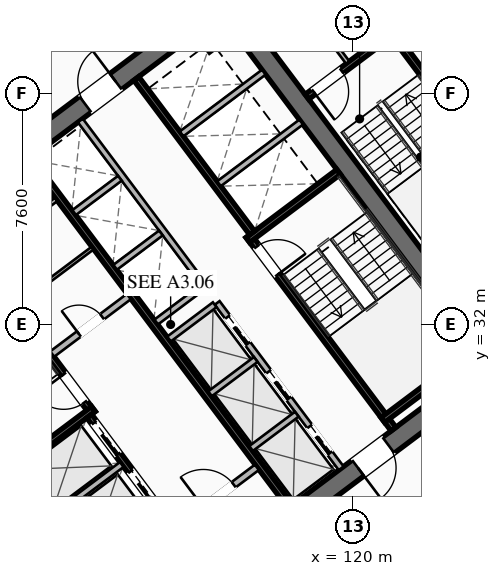
"""IFC4 building model, lengths in metres.
Left out: names, types, materials, properties, quantities, classifications, styles, units other than length and angle.
Written with IfcOpenShell. Run it as: python <this file> out.ifc"""

import sys

from ifc_helpers import new_model, si_unit, direction, frame, frame_2d, origin, place, context, subcontext, project, spatial, rectangle, extrude, element, fill, save


model = new_model("IFC4")
c1 = context("Model", 3, precision=1e-05, world=origin(), true_north=direction((0.0, 1.0)))
c2 = subcontext(c1, "Body", "Model", "MODEL_VIEW")
j1 = project(units=[si_unit("LENGTHUNIT", "METRE"), si_unit("PLANEANGLEUNIT", "RADIAN")], contexts=[c1])
p1 = place(None, origin())
s1 = spatial("IfcSite", under=j1, at=p1, CompositionType="ELEMENT")
p2 = place(p1, origin())
s2 = spatial("IfcBuilding", under=s1, at=p2, CompositionType="ELEMENT")
p3 = place(p2, frame((0.0, 0.0, 42.35)))
s3 = spatial("IfcBuildingStorey", under=s2, at=p3, CompositionType="ELEMENT", Elevation=42.35)
for number, where, z_axis, x_axis in (
    (1, (112.476, 21.107, 0.0), (0.0, 0.0, 1.0), (-0.6, 0.8, 0.0)),
    (2, (115.524, 42.893, 0.0), (0.0, 0.0, 1.0), (0.6, -0.8, 0.0)),
):
    element("IfcWall", number, at=place(p3, frame(where, z_axis=z_axis, x_axis=x_axis)), inside=s3, PredefinedType="SHEAR", context=c2, shape_type="SweptSolid", body=[
        extrude(rectangle(XDim=15.6, YDim=0.65, at=frame_2d((7.8, 0.0))), origin(), (0.0, 0.0, 1.0), 3.55),
    ])
p4 = place(p3, frame((124.429, 30.478, 0.0), z_axis=(0.0, 0.0, 1.0), x_axis=(-0.799998028465, -0.600002628705, 0.0)))
e3 = element("IfcWall", 3, at=p4, inside=s3, PredefinedType="SHEAR", context=c2, shape_type="SweptSolid", body=[
    extrude(rectangle(XDim=14.86, YDim=0.65, at=frame_2d((7.43, 0.0))), origin(), (0.0, 0.0, 1.0), 3.55),
])
p5 = place(p4, frame((9.13, 0.0, 0.0)))
e4 = element("IfcOpeningElement", 4, at=p5, cuts=e3, PredefinedType="OPENING", context=c2, shape_type="SweptSolid", body=[
    extrude(rectangle(XDim=1.25, YDim=2.25, at=frame_2d((0.625, 1.125))), frame((0.0, 0.335, 0.0), z_axis=(0.0, -1.0, 0.0), x_axis=(1.0, 0.0, 0.0)), (0.0, 0.0, 1.0), 0.67),
])
p6 = place(p4, frame((4.08, 0.0, 0.0)))
e5 = element("IfcOpeningElement", 5, at=p6, cuts=e3, PredefinedType="OPENING", context=c2, shape_type="SweptSolid", body=[
    extrude(rectangle(XDim=1.25, YDim=2.25, at=frame_2d((0.625, 1.125))), frame((0.0, 0.335, 0.0), z_axis=(0.0, -1.0, 0.0), x_axis=(1.0, 0.0, 0.0)), (0.0, 0.0, 1.0), 0.67),
])
p7 = place(p3, frame((103.571, 33.522, 0.0), z_axis=(0.0, 0.0, 1.0), x_axis=(0.799998028465, 0.600002628705, 0.0)))
e6 = element("IfcWall", 6, at=p7, inside=s3, PredefinedType="SHEAR", context=c2, shape_type="SweptSolid", body=[
    extrude(rectangle(XDim=14.86, YDim=0.65, at=frame_2d((7.43, 0.0))), origin(), (0.0, 0.0, 1.0), 3.55),
])
p8 = place(p7, frame((4.48, 0.0, 0.0)))
e7 = element("IfcOpeningElement", 7, at=p8, cuts=e6, PredefinedType="OPENING", context=c2, shape_type="SweptSolid", body=[
    extrude(rectangle(XDim=1.25, YDim=2.25, at=frame_2d((0.625, 1.125))), frame((0.0, 0.335, 0.0), z_axis=(0.0, -1.0, 0.0), x_axis=(1.0, 0.0, 0.0)), (0.0, 0.0, 1.0), 0.67),
])
p9 = place(p7, frame((9.53, 0.0, 0.0)))
e8 = element("IfcOpeningElement", 8, at=p9, cuts=e6, PredefinedType="OPENING", context=c2, shape_type="SweptSolid", body=[
    extrude(rectangle(XDim=1.25, YDim=2.25, at=frame_2d((0.625, 1.125))), frame((0.0, 0.335, 0.0), z_axis=(0.0, -1.0, 0.0), x_axis=(1.0, 0.0, 0.0)), (0.0, 0.0, 1.0), 0.67),
])
p10 = place(p3, frame((111.44, 29.08, 0.0), z_axis=(0.0, 0.0, 1.0), x_axis=(-0.600009827119, 0.799992629566, 0.0)))
e9 = element("IfcWall", 9, at=p10, inside=s3, PredefinedType="SHEAR", context=c2, shape_type="SweptSolid", body=[
    extrude(rectangle(XDim=7.95, YDim=0.2, at=frame_2d((3.975, 0.0))), origin(), (0.0, 0.0, 1.0), 3.35),
])
p11 = place(p10, frame((0.45, 0.0, 0.0)))
e10 = element("IfcOpeningElement", 10, at=p11, cuts=e9, PredefinedType="OPENING", context=c2, shape_type="SweptSolid", body=[
    extrude(rectangle(XDim=1.15, YDim=2.2, at=frame_2d((0.575, 1.1))), frame((0.0, 0.11, 0.0), z_axis=(0.0, -1.0, 0.0), x_axis=(1.0, 0.0, 0.0)), (0.0, 0.0, 1.0), 0.22),
])
p12 = place(p3, frame((108.476, 26.982, 0.0), z_axis=(0.0, 0.0, 1.0), x_axis=(0.799984290658, 0.600020945218, 0.0)))
e11 = element("IfcWall", 11, at=p12, inside=s3, PredefinedType="SHEAR", context=c2, shape_type="SweptSolid", body=[
    extrude(rectangle(XDim=3.73, YDim=0.2, at=frame_2d((1.865, 0.0))), origin(), (0.0, 0.0, 1.0), 3.35),
])
p13 = place(p3, frame((116.56, 34.92, 0.0), z_axis=(0.0, 0.0, 1.0), x_axis=(0.600009827119, -0.799992629566, 0.0)))
e12 = element("IfcWall", 12, at=p13, inside=s3, PredefinedType="SHEAR", context=c2, shape_type="SweptSolid", body=[
    extrude(rectangle(XDim=7.95, YDim=0.2, at=frame_2d((3.975, 0.0))), origin(), (0.0, 0.0, 1.0), 3.35),
])
p14 = place(p13, frame((0.45, 0.0, 0.0)))
e13 = element("IfcOpeningElement", 13, at=p14, cuts=e12, PredefinedType="OPENING", context=c2, shape_type="SweptSolid", body=[
    extrude(rectangle(XDim=1.15, YDim=2.2, at=frame_2d((0.575, 1.1))), frame((0.0, 0.11, 0.0), z_axis=(0.0, -1.0, 0.0), x_axis=(1.0, 0.0, 0.0)), (0.0, 0.0, 1.0), 0.22),
])
for number, where, z_axis, x_axis in (
    (14, (116.54, 34.78, 0.0), (0.0, 0.0, 1.0), (0.8, 0.6, 0.0)),
    (15, (120.98, 28.86, 0.0), (0.0, 0.0, 1.0), (0.8, 0.6, 0.0)),
):
    element("IfcWall", number, at=place(p3, frame(where, z_axis=z_axis, x_axis=x_axis)), inside=s3, PredefinedType="SHEAR", context=c2, shape_type="SweptSolid", body=[
        extrude(rectangle(XDim=3.73, YDim=0.2, at=frame_2d((1.865, 0.0))), origin(), (0.0, 0.0, 1.0), 3.35),
    ])
p15 = place(p3, frame((117.938, 26.016, 0.0), z_axis=(0.0, 0.0, 1.0), x_axis=(-0.600005463273, 0.799995902516, 0.0)))
e16 = element("IfcWall", 16, at=p15, inside=s3, PredefinedType="SHEAR", context=c2, shape_type="SweptSolid", body=[
    extrude(rectangle(XDim=14.3, YDim=0.2, at=frame_2d((7.15, 0.0))), origin(), (0.0, 0.0, 1.0), 3.35),
])
p16 = place(p3, frame((110.104, 31.028, 0.0), z_axis=(0.0, 0.0, 1.0), x_axis=(0.800018601094, 0.59997519774, 0.0)))
e17 = element("IfcWall", 17, at=p16, inside=s3, PredefinedType="SOLIDWALL", context=c2, shape_type="SweptSolid", body=[
    extrude(rectangle(XDim=3.15, YDim=0.22, at=frame_2d((1.575, 0.0))), origin(), (0.0, 0.0, 1.0), 2.703),
])
p17 = place(p16, frame((1.1, 0.0, 0.0)))
e18 = element("IfcOpeningElement", 18, at=p17, cuts=e17, PredefinedType="OPENING", context=c2, shape_type="SweptSolid", body=[
    extrude(rectangle(XDim=0.95, YDim=2.05, at=frame_2d((0.475, 1.025))), frame((0.0, 0.12, 0.0), z_axis=(0.0, -1.0, 0.0), x_axis=(1.0, 0.0, 0.0)), (0.0, 0.0, 1.0), 0.24),
])
p18 = place(p3, frame((114.316, 25.412, 0.0), z_axis=(0.0, 0.0, 1.0), x_axis=(0.800018601094, 0.59997519774, 0.0)))
e19 = element("IfcWall", 19, at=p18, inside=s3, PredefinedType="SOLIDWALL", context=c2, shape_type="SweptSolid", body=[
    extrude(rectangle(XDim=3.15, YDim=0.22, at=frame_2d((1.575, 0.0))), origin(), (0.0, 0.0, 1.0), 2.703),
])
p19 = place(p18, frame((0.95, 0.0, 0.0)))
e20 = element("IfcOpeningElement", 20, at=p19, cuts=e19, PredefinedType="OPENING", context=c2, shape_type="SweptSolid", body=[
    extrude(rectangle(XDim=1.25, YDim=2.25, at=frame_2d((0.625, 1.125))), frame((0.0, 0.12, 0.0), z_axis=(0.0, -1.0, 0.0), x_axis=(1.0, 0.0, 0.0)), (0.0, 0.0, 1.0), 0.24),
])
p20 = place(p3, frame((115.13, 23.91, 0.0), z_axis=(0.0, 0.0, 1.0), x_axis=(-0.599975393228, 0.800018454488, 0.0)))
e21 = element("IfcWall", 21, at=p20, inside=s3, PredefinedType="SHEAR", context=c2, shape_type="SweptSolid", body=[
    extrude(rectangle(XDim=6.35, YDim=0.2, at=frame_2d((3.175, 0.0))), origin(), (0.0, 0.0, 1.0), 3.35),
])
p21 = place(p20, frame((4.775, 0.0, 0.0)))
e22 = element("IfcOpeningElement", 22, at=p21, cuts=e21, PredefinedType="OPENING", context=c2, shape_type="SweptSolid", body=[
    extrude(rectangle(XDim=1.3, YDim=2.25, at=frame_2d((0.65, 1.125))), frame((0.0, 0.11, 0.0), z_axis=(0.0, -1.0, 0.0), x_axis=(1.0, 0.0, 0.0)), (0.0, 0.0, 1.0), 0.22),
])
p22 = place(p20, frame((2.775, 0.0, 0.0)))
e23 = element("IfcOpeningElement", 23, at=p22, cuts=e21, PredefinedType="OPENING", context=c2, shape_type="SweptSolid", body=[
    extrude(rectangle(XDim=1.3, YDim=2.25, at=frame_2d((0.65, 1.125))), frame((0.0, 0.11, 0.0), z_axis=(0.0, -1.0, 0.0), x_axis=(1.0, 0.0, 0.0)), (0.0, 0.0, 1.0), 0.22),
])
p23 = place(p20, frame((0.575, 0.0, 0.0)))
e24 = element("IfcOpeningElement", 24, at=p23, cuts=e21, PredefinedType="OPENING", context=c2, shape_type="SweptSolid", body=[
    extrude(rectangle(XDim=1.3, YDim=2.25, at=frame_2d((0.65, 1.125))), frame((0.0, 0.11, 0.0), z_axis=(0.0, -1.0, 0.0), x_axis=(1.0, 0.0, 0.0)), (0.0, 0.0, 1.0), 0.22),
])
p24 = place(p3, frame((109.688, 25.366, 0.0), z_axis=(0.0, 0.0, 1.0), x_axis=(0.8, 0.6, 0.0)))
e25 = element("IfcWall", 25, at=p24, inside=s3, PredefinedType="SOLIDWALL", context=c2, shape_type="SweptSolid", body=[
    extrude(rectangle(XDim=3.38, YDim=0.2, at=frame_2d((1.69, 0.0))), origin(), (0.0, 0.0, 1.0), 3.35),
])
p25 = place(p3, frame((112.87, 40.09, 0.0), z_axis=(0.0, 0.0, 1.0), x_axis=(0.599975393228, -0.800018454488, 0.0)))
e26 = element("IfcWall", 26, at=p25, inside=s3, PredefinedType="SHEAR", context=c2, shape_type="SweptSolid", body=[
    extrude(rectangle(XDim=6.35, YDim=0.2, at=frame_2d((3.175, 0.0))), origin(), (0.0, 0.0, 1.0), 3.35),
])
for number, where, z_axis, x_axis in (
    (27, (115.59, 36.63, 0.0), (0.0, 0.0, 1.0), (0.8, 0.6, 0.0)),
    (28, (114.36, 38.27, 0.0), (0.0, 0.0, 1.0), (0.8, 0.6, 0.0)),
):
    element("IfcWall", number, at=place(p3, frame(where, z_axis=z_axis, x_axis=x_axis)), inside=s3, PredefinedType="SOLIDWALL", context=c2, shape_type="SweptSolid", body=[
        extrude(rectangle(XDim=3.38, YDim=0.2, at=frame_2d((1.69, 0.0))), origin(), (0.0, 0.0, 1.0), 3.35),
    ])
p26 = place(p3, frame((107.71, 34.22, 0.0), z_axis=(0.0, 0.0, 1.0), x_axis=(0.799981399002, 0.60002480053, 0.0)))
e29 = element("IfcWall", 29, at=p26, inside=s3, PredefinedType="PARTITIONING", context=c2, shape_type="SweptSolid", body=[
    extrude(rectangle(XDim=3.15, YDim=0.135, at=frame_2d((1.575, 0.0))), origin(), (0.0, 0.0, 1.0), 2.703),
])
p27 = place(p26, frame((1.05, 0.0, 0.0)))
e30 = element("IfcOpeningElement", 30, at=p27, cuts=e29, PredefinedType="OPENING", context=c2, shape_type="SweptSolid", body=[
    extrude(rectangle(XDim=1.05, YDim=2.2, at=frame_2d((0.525, 1.1))), frame((0.0, 0.077, 0.0), z_axis=(0.0, -1.0, 0.0), x_axis=(1.0, 0.0, 0.0)), (0.0, 0.0, 1.0), 0.155),
])
p28 = place(p3, frame((108.91, 32.62, 0.0), z_axis=(0.0, 0.0, 1.0), x_axis=(0.800018601094, 0.59997519774, 0.0)))
e31 = element("IfcWall", 31, at=p28, inside=s3, PredefinedType="PARTITIONING", context=c2, shape_type="SweptSolid", body=[
    extrude(rectangle(XDim=3.15, YDim=0.11, at=frame_2d((1.575, 0.0))), origin(), (0.0, 0.0, 1.0), 2.703),
])
p29 = place(p3, frame((119.61, 27.27, 0.0), z_axis=(0.0, 0.0, 1.0), x_axis=(-0.600011488909, 0.79999138319, 0.0)))
e32 = element("IfcWall", 32, at=p29, inside=s3, PredefinedType="SOLIDWALL", context=c2, shape_type="SweptSolid", body=[
    extrude(rectangle(XDim=6.8, YDim=0.2, at=frame_2d((3.4, 0.0))), origin(), (0.0, 0.0, 1.0), 3.35),
])
p30 = place(p29, frame((0.625, 0.0, 0.0)))
e33 = element("IfcOpeningElement", 33, at=p30, cuts=e32, PredefinedType="OPENING", context=c2, shape_type="SweptSolid", body=[
    extrude(rectangle(XDim=1.1, YDim=2.2, at=frame_2d((0.55, 1.1))), frame((0.0, 0.11, 0.0), z_axis=(0.0, -1.0, 0.0), x_axis=(1.0, 0.0, 0.0)), (0.0, 0.0, 1.0), 0.22),
])
p31 = place(p29, frame((2.875, 0.0, 0.0)))
e34 = element("IfcOpeningElement", 34, at=p31, cuts=e32, PredefinedType="OPENING", context=c2, shape_type="SweptSolid", body=[
    extrude(rectangle(XDim=1.1, YDim=2.2, at=frame_2d((0.55, 1.1))), frame((0.0, 0.11, 0.0), z_axis=(0.0, -1.0, 0.0), x_axis=(1.0, 0.0, 0.0)), (0.0, 0.0, 1.0), 0.22),
])
p32 = place(p29, frame((5.125, 0.0, 0.0)))
e35 = element("IfcOpeningElement", 35, at=p32, cuts=e32, PredefinedType="OPENING", context=c2, shape_type="SweptSolid", body=[
    extrude(rectangle(XDim=1.1, YDim=2.2, at=frame_2d((0.55, 1.1))), frame((0.0, 0.11, 0.0), z_axis=(0.0, -1.0, 0.0), x_axis=(1.0, 0.0, 0.0)), (0.0, 0.0, 1.0), 0.22),
])
p33 = place(p3, frame((116.646, 27.922, 0.0), z_axis=(0.0, 0.0, 1.0), x_axis=(0.8, 0.6, 0.0)))
e36 = element("IfcWall", 36, at=p33, inside=s3, PredefinedType="SOLIDWALL", context=c2, shape_type="SweptSolid", body=[
    extrude(rectangle(XDim=1.88, YDim=0.2, at=frame_2d((0.94, 0.0))), origin(), (0.0, 0.0, 1.0), 3.35),
])
p34 = place(p3, frame((115.296, 29.722, 0.0), z_axis=(0.0, 0.0, 1.0), x_axis=(0.799984418148, 0.600020775241, 0.0)))
e37 = element("IfcWall", 37, at=p34, inside=s3, PredefinedType="SOLIDWALL", context=c2, shape_type="SweptSolid", body=[
    extrude(rectangle(XDim=1.88, YDim=0.2, at=frame_2d((0.94, 0.0))), origin(), (0.0, 0.0, 1.0), 3.35),
])
p35 = place(p3, frame((113.946, 31.522, 0.0), z_axis=(0.0, 0.0, 1.0), x_axis=(0.8, 0.6, 0.0)))
e38 = element("IfcWall", 38, at=p35, inside=s3, PredefinedType="SOLIDWALL", context=c2, shape_type="SweptSolid", body=[
    extrude(rectangle(XDim=1.88, YDim=0.2, at=frame_2d((0.94, 0.0))), origin(), (0.0, 0.0, 1.0), 3.35),
])
p36 = place(p3, frame((115.11, 33.27, 0.0), z_axis=(0.0, 0.0, 1.0), x_axis=(-0.600011488909, 0.79999138319, 0.0)))
e39 = element("IfcWall", 39, at=p36, inside=s3, PredefinedType="SOLIDWALL", context=c2, shape_type="SweptSolid", body=[
    extrude(rectangle(XDim=6.8, YDim=0.2, at=frame_2d((3.4, 0.0))), origin(), (0.0, 0.0, 1.0), 3.35),
])
p37 = place(p3, frame((113.526, 32.082, 0.0), z_axis=(0.0, 0.0, 1.0), x_axis=(0.800046745961, 0.599937666993, 0.0)))
e40 = element("IfcWall", 40, at=p37, inside=s3, PredefinedType="SOLIDWALL", context=c2, shape_type="SweptSolid", body=[
    extrude(rectangle(XDim=1.88, YDim=0.2, at=frame_2d((0.94, 0.0))), origin(), (0.0, 0.0, 1.0), 3.35),
])
p38 = place(p3, frame((112.176, 33.882, 0.0), z_axis=(0.0, 0.0, 1.0), x_axis=(0.8, 0.6, 0.0)))
e41 = element("IfcWall", 41, at=p38, inside=s3, PredefinedType="SOLIDWALL", context=c2, shape_type="SweptSolid", body=[
    extrude(rectangle(XDim=1.88, YDim=0.2, at=frame_2d((0.94, 0.0))), origin(), (0.0, 0.0, 1.0), 3.35),
])
p39 = place(p3, frame((110.826, 35.682, 0.0), z_axis=(0.0, 0.0, 1.0), x_axis=(0.799984418148, 0.600020775241, 0.0)))
e42 = element("IfcWall", 42, at=p39, inside=s3, PredefinedType="SOLIDWALL", context=c2, shape_type="SweptSolid", body=[
    extrude(rectangle(XDim=1.88, YDim=0.2, at=frame_2d((0.94, 0.0))), origin(), (0.0, 0.0, 1.0), 3.35),
])
p40 = place(p3, frame((125.304, 36.228, 0.0), z_axis=(0.0, 0.0, 1.0), x_axis=(-0.59998851072, 0.800008616831, 0.0)))
e43 = element("IfcWall", 43, at=p40, inside=s3, PredefinedType="SHEAR", context=c2, shape_type="SweptSolid", body=[
    extrude(rectangle(XDim=6.8, YDim=0.2, at=frame_2d((3.4, 0.0))), origin(), (0.0, 0.0, 1.0), 3.35),
])
p41 = place(p3, frame((121.204, 41.528, 0.0), z_axis=(0.0, 0.0, 1.0), x_axis=(-0.800017232136, -0.599977023131, 0.0)))
e44 = element("IfcWall", 44, at=p41, inside=s3, PredefinedType="SHEAR", context=c2, shape_type="SweptSolid", body=[
    extrude(rectangle(XDim=3.4, YDim=0.2, at=frame_2d((1.7, 0.0))), origin(), (0.0, 0.0, 1.0), 3.35),
])
p42 = place(p41, frame((1.975, 0.0, 0.0)))
e45 = element("IfcOpeningElement", 45, at=p42, cuts=e44, PredefinedType="OPENING", context=c2, shape_type="SweptSolid", body=[
    extrude(rectangle(XDim=1.15, YDim=2.2, at=frame_2d((0.575, 1.1))), frame((0.0, 0.11, 0.0), z_axis=(0.0, -1.0, 0.0), x_axis=(1.0, 0.0, 0.0)), (0.0, 0.0, 1.0), 0.22),
])
p43 = place(p3, frame((119.824, 40.618, 0.0), z_axis=(0.0, 0.0, 1.0), x_axis=(-0.599982243973, 0.800013316712, 0.0)))
e46 = element("IfcWall", 46, at=p43, inside=s3, PredefinedType="PARTITIONING", context=c2, shape_type="SweptSolid", body=[
    extrude(rectangle(XDim=4.4, YDim=0.135, at=frame_2d((2.2, 0.0))), origin(), (0.0, 0.0, 1.0), 2.703),
])
p44 = place(p3, frame((98.084, 34.588, 0.0), z_axis=(0.0, 0.0, 1.0), x_axis=(0.799997053619, 0.600003928488, 0.0)))
e47 = element("IfcWall", 47, at=p44, inside=s3, PredefinedType="PARTITIONING", context=c2, shape_type="SweptSolid", body=[
    extrude(rectangle(XDim=29.83, YDim=0.135, at=frame_2d((14.915, 0.0))), origin(), (0.0, 0.0, 1.0), 2.703),
])
p45 = place(p44, frame((0.3, 0.0, 0.0)))
e48 = element("IfcOpeningElement", 48, at=p45, cuts=e47, PredefinedType="OPENING", context=c2, shape_type="SweptSolid", body=[
    extrude(rectangle(XDim=0.95, YDim=2.05, at=frame_2d((0.475, 1.025))), frame((0.0, 0.077, 0.0), z_axis=(0.0, -1.0, 0.0), x_axis=(1.0, 0.0, 0.0)), (0.0, 0.0, 1.0), 0.155),
])
p46 = place(p44, frame((28.58, 0.0, 0.0)))
e49 = element("IfcOpeningElement", 49, at=p46, cuts=e47, PredefinedType="OPENING", context=c2, shape_type="SweptSolid", body=[
    extrude(rectangle(XDim=0.95, YDim=2.05, at=frame_2d((0.475, 1.025))), frame((0.0, 0.077, 0.0), z_axis=(0.0, -1.0, 0.0), x_axis=(1.0, 0.0, 0.0)), (0.0, 0.0, 1.0), 0.155),
])
p47 = place(p3, frame((135.46, 34.47, 0.0), z_axis=(0.0, 0.0, 1.0), x_axis=(-0.800000982127, -0.599998690494, 0.0)))
e50 = element("IfcWall", 50, at=p47, inside=s3, PredefinedType="PARTITIONING", context=c2, shape_type="SweptSolid", body=[
    extrude(rectangle(XDim=29.83, YDim=0.135, at=frame_2d((14.915, 0.0))), origin(), (0.0, 0.0, 1.0), 2.703),
])
p48 = place(p47, frame((28.5, 0.0, 0.0)))
e51 = element("IfcOpeningElement", 51, at=p48, cuts=e50, PredefinedType="OPENING", context=c2, shape_type="SweptSolid", body=[
    extrude(rectangle(XDim=0.95, YDim=2.05, at=frame_2d((0.475, 1.025))), frame((0.0, 0.077, 0.0), z_axis=(0.0, -1.0, 0.0), x_axis=(1.0, 0.0, 0.0)), (0.0, 0.0, 1.0), 0.155),
])
p49 = place(p47, frame((17.901, 0.0, 0.0)))
e52 = element("IfcOpeningElement", 52, at=p49, cuts=e50, PredefinedType="OPENING", context=c2, shape_type="SweptSolid", body=[
    extrude(rectangle(XDim=0.95, YDim=2.05, at=frame_2d((0.475, 1.025))), frame((0.0, 0.077, 0.0), z_axis=(0.0, -1.0, 0.0), x_axis=(1.0, 0.0, 0.0)), (0.0, 0.0, 1.0), 0.155),
])
p50 = place(p47, frame((13.92, 0.0, 0.0)))
e53 = element("IfcOpeningElement", 53, at=p50, cuts=e50, PredefinedType="OPENING", context=c2, shape_type="SweptSolid", body=[
    extrude(rectangle(XDim=0.95, YDim=2.05, at=frame_2d((0.475, 1.025))), frame((0.0, 0.077, 0.0), z_axis=(0.0, -1.0, 0.0), x_axis=(1.0, 0.0, 0.0)), (0.0, 0.0, 1.0), 0.155),
])
p51 = place(p47, frame((0.38, 0.0, 0.0)))
e54 = element("IfcOpeningElement", 54, at=p51, cuts=e50, PredefinedType="OPENING", context=c2, shape_type="SweptSolid", body=[
    extrude(rectangle(XDim=0.95, YDim=2.05, at=frame_2d((0.475, 1.025))), frame((0.0, 0.077, 0.0), z_axis=(0.0, -1.0, 0.0), x_axis=(1.0, 0.0, 0.0)), (0.0, 0.0, 1.0), 0.155),
])
p52 = place(p3, frame((111.548, 16.636, 0.0), z_axis=(0.0, 0.0, 1.0), x_axis=(-0.600001746983, 0.79999868976, 0.0)))
e55 = element("IfcWall", 55, at=p52, inside=s3, PredefinedType="PARTITIONING", context=c2, shape_type="SweptSolid", body=[
    extrude(rectangle(XDim=22.36, YDim=0.135, at=frame_2d((11.18, 0.0))), origin(), (0.0, 0.0, 1.0), 2.703),
])
p53 = place(p52, frame((21.11, 0.0, 0.0)))
e56 = element("IfcOpeningElement", 56, at=p53, cuts=e55, PredefinedType="OPENING", context=c2, shape_type="SweptSolid", body=[
    extrude(rectangle(XDim=0.95, YDim=2.05, at=frame_2d((0.475, 1.025))), frame((0.0, 0.077, 0.0), z_axis=(0.0, -1.0, 0.0), x_axis=(1.0, 0.0, 0.0)), (0.0, 0.0, 1.0), 0.155),
])
p54 = place(p9, origin())
e57 = element("IfcDoor", 57, at=p54, inside=s3, OperationType="SINGLE_SWING_RIGHT", PredefinedType="DOOR", context=c2, shape_type="SweptSolid", body=[
    extrude(rectangle(XDim=1.25, YDim=2.25, at=frame_2d((0.625, 1.125))), frame((0.0, 0.025, 0.0), z_axis=(0.0, -1.0, 0.0), x_axis=(1.0, 0.0, 0.0)), (0.0, 0.0, 1.0), 0.05),
])
fill(e8, e57)
p55 = place(p6, origin())
e58 = element("IfcDoor", 58, at=p55, inside=s3, OperationType="SINGLE_SWING_RIGHT", PredefinedType="DOOR", context=c2, shape_type="SweptSolid", body=[
    extrude(rectangle(XDim=1.25, YDim=2.25, at=frame_2d((0.625, 1.125))), frame((0.0, 0.025, 0.0), z_axis=(0.0, -1.0, 0.0), x_axis=(1.0, 0.0, 0.0)), (0.0, 0.0, 1.0), 0.05),
])
fill(e5, e58)
p56 = place(p11, origin())
e59 = element("IfcDoor", 59, at=p56, inside=s3, OperationType="SINGLE_SWING_RIGHT", PredefinedType="DOOR", context=c2, shape_type="SweptSolid", body=[
    extrude(rectangle(XDim=1.15, YDim=2.2, at=frame_2d((0.575, 1.1))), frame((0.0, 0.025, 0.0), z_axis=(0.0, -1.0, 0.0), x_axis=(1.0, 0.0, 0.0)), (0.0, 0.0, 1.0), 0.05),
])
fill(e10, e59)
p57 = place(p14, origin())
e60 = element("IfcDoor", 60, at=p57, inside=s3, OperationType="SINGLE_SWING_RIGHT", PredefinedType="DOOR", context=c2, shape_type="SweptSolid", body=[
    extrude(rectangle(XDim=1.15, YDim=2.2, at=frame_2d((0.575, 1.1))), frame((0.0, 0.025, 0.0), z_axis=(0.0, -1.0, 0.0), x_axis=(1.0, 0.0, 0.0)), (0.0, 0.0, 1.0), 0.05),
])
fill(e13, e60)
p58 = place(p19, origin())
e61 = element("IfcDoor", 61, at=p58, inside=s3, OperationType="SINGLE_SWING_LEFT", PredefinedType="DOOR", context=c2, shape_type="SweptSolid", body=[
    extrude(rectangle(XDim=1.25, YDim=2.25, at=frame_2d((0.625, 1.125))), frame((0.0, 0.025, 0.0), z_axis=(0.0, -1.0, 0.0), x_axis=(1.0, 0.0, 0.0)), (0.0, 0.0, 1.0), 0.05),
])
fill(e20, e61)
p59 = place(p17, origin())
e62 = element("IfcDoor", 62, at=p59, inside=s3, OperationType="SINGLE_SWING_LEFT", PredefinedType="DOOR", context=c2, shape_type="SweptSolid", body=[
    extrude(rectangle(XDim=0.95, YDim=2.05, at=frame_2d((0.475, 1.025))), frame((0.0, 0.025, 0.0), z_axis=(0.0, -1.0, 0.0), x_axis=(1.0, 0.0, 0.0)), (0.0, 0.0, 1.0), 0.05),
])
fill(e18, e62)
p60 = place(p42, origin())
e63 = element("IfcDoor", 63, at=p60, inside=s3, OperationType="SINGLE_SWING_RIGHT", PredefinedType="DOOR", context=c2, shape_type="SweptSolid", body=[
    extrude(rectangle(XDim=1.15, YDim=2.2, at=frame_2d((0.575, 1.1))), frame((0.0, 0.025, 0.0), z_axis=(0.0, -1.0, 0.0), x_axis=(1.0, 0.0, 0.0)), (0.0, 0.0, 1.0), 0.05),
])
fill(e45, e63)
p61 = place(p21, origin())
e64 = element("IfcDoor", 64, at=p61, inside=s3, OperationType="SLIDING_TO_LEFT", PredefinedType="DOOR", context=c2, shape_type="SweptSolid", body=[
    extrude(rectangle(XDim=1.3, YDim=2.25, at=frame_2d((0.65, 1.125))), frame((0.0, 0.025, 0.0), z_axis=(0.0, -1.0, 0.0), x_axis=(1.0, 0.0, 0.0)), (0.0, 0.0, 1.0), 0.05),
])
fill(e22, e64)
p62 = place(p22, origin())
e65 = element("IfcDoor", 65, at=p62, inside=s3, OperationType="SLIDING_TO_LEFT", PredefinedType="DOOR", context=c2, shape_type="SweptSolid", body=[
    extrude(rectangle(XDim=1.3, YDim=2.25, at=frame_2d((0.65, 1.125))), frame((0.0, 0.025, 0.0), z_axis=(0.0, -1.0, 0.0), x_axis=(1.0, 0.0, 0.0)), (0.0, 0.0, 1.0), 0.05),
])
fill(e23, e65)
p63 = place(p30, origin())
e66 = element("IfcDoor", 66, at=p63, inside=s3, OperationType="SLIDING_TO_LEFT", PredefinedType="DOOR", context=c2, shape_type="SweptSolid", body=[
    extrude(rectangle(XDim=1.1, YDim=2.2, at=frame_2d((0.55, 1.1))), frame((0.0, 0.025, 0.0), z_axis=(0.0, -1.0, 0.0), x_axis=(1.0, 0.0, 0.0)), (0.0, 0.0, 1.0), 0.05),
])
fill(e33, e66)
p64 = place(p31, origin())
e67 = element("IfcDoor", 67, at=p64, inside=s3, OperationType="SLIDING_TO_LEFT", PredefinedType="DOOR", context=c2, shape_type="SweptSolid", body=[
    extrude(rectangle(XDim=1.1, YDim=2.2, at=frame_2d((0.55, 1.1))), frame((0.0, 0.025, 0.0), z_axis=(0.0, -1.0, 0.0), x_axis=(1.0, 0.0, 0.0)), (0.0, 0.0, 1.0), 0.05),
])
fill(e34, e67)
p65 = place(p32, origin())
e68 = element("IfcDoor", 68, at=p65, inside=s3, OperationType="SLIDING_TO_LEFT", PredefinedType="DOOR", context=c2, shape_type="SweptSolid", body=[
    extrude(rectangle(XDim=1.1, YDim=2.2, at=frame_2d((0.55, 1.1))), frame((0.0, 0.025, 0.0), z_axis=(0.0, -1.0, 0.0), x_axis=(1.0, 0.0, 0.0)), (0.0, 0.0, 1.0), 0.05),
])
fill(e35, e68)
save(model, sys.argv[1])
